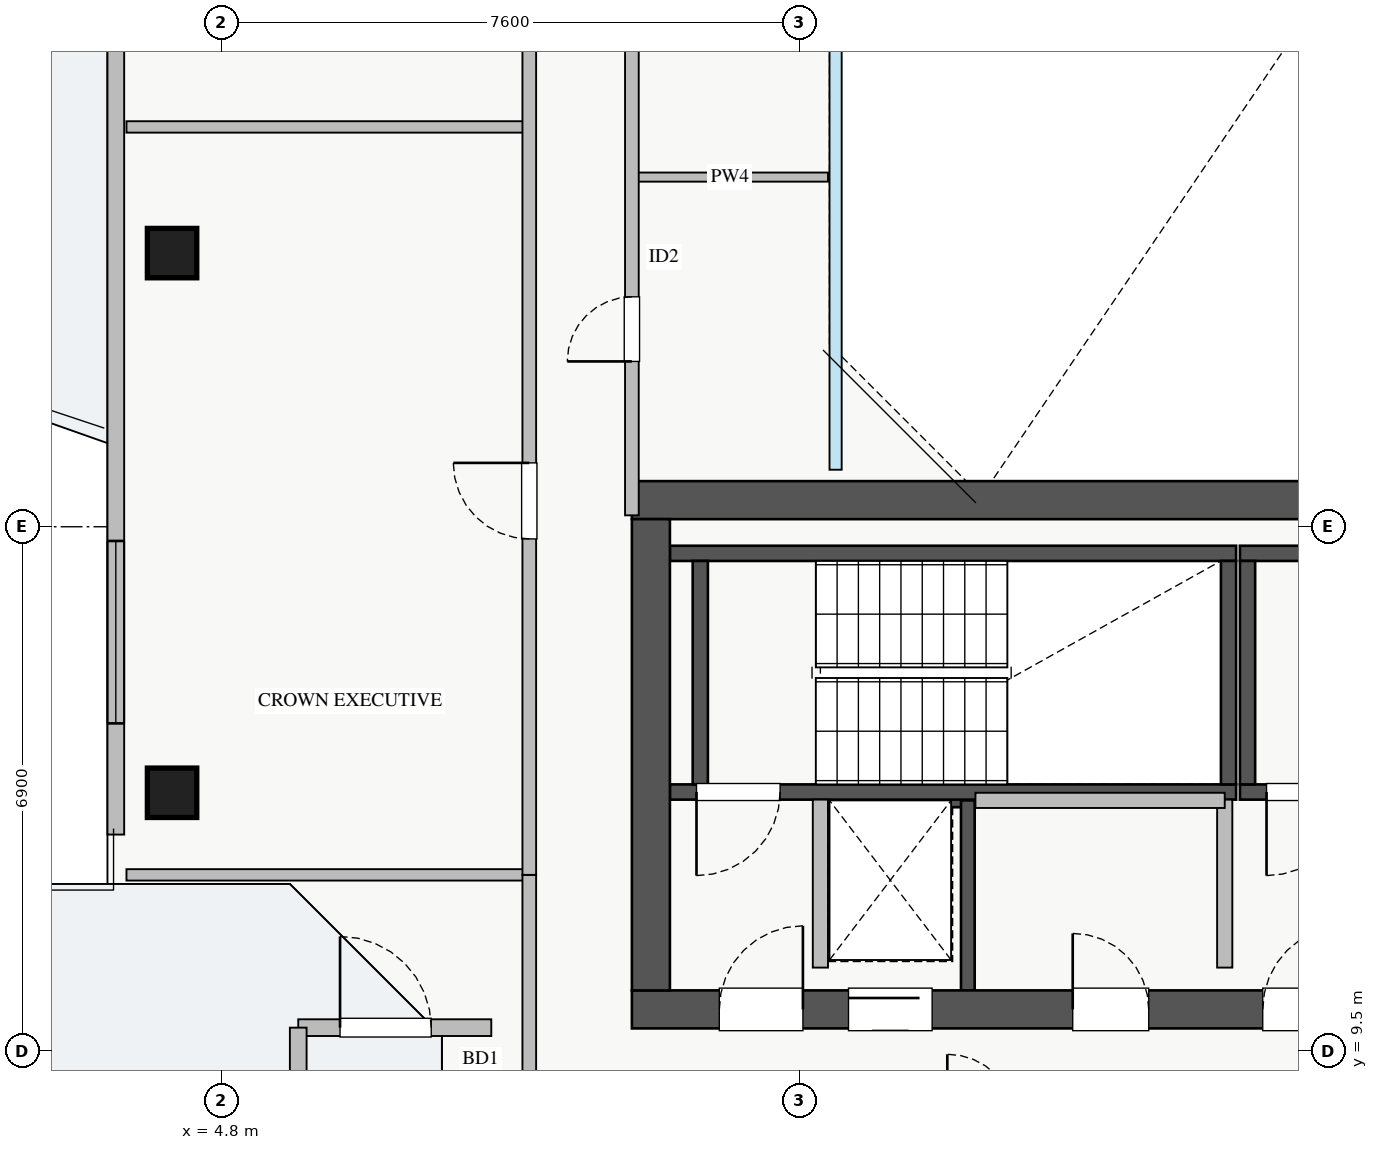
"""IFC4 building model, lengths in metres.
Left out: names, types, materials, properties, quantities, classifications, styles, units other than length and angle.
Written with IfcOpenShell. Run it as: python <this file> out.ifc"""

import sys

from ifc_helpers import new_model, si_unit, direction, frame, frame_2d, origin, origin_2d, place, context, subcontext, project, spatial, rectangle, extrude, source, transform, mapped, element, fill, save


model = new_model("IFC4")
c1 = context("Model", 3, precision=1e-05, world=origin(), true_north=direction((0.0, 1.0)))
c2 = subcontext(c1, "Body", "Model", "MODEL_VIEW")
j1 = project(units=[si_unit("LENGTHUNIT", "METRE"), si_unit("PLANEANGLEUNIT", "RADIAN")], contexts=[c1])
p1 = place(None, origin())
s1 = spatial("IfcSite", under=j1, at=p1, CompositionType="ELEMENT")
p2 = place(p1, origin())
s2 = spatial("IfcBuilding", under=s1, at=p2, CompositionType="ELEMENT")
p3 = place(p2, frame((0.0, 0.0, 243.75)))
s3 = spatial("IfcBuildingStorey", under=s2, at=p3, CompositionType="ELEMENT", Elevation=243.75)
p4 = place(p3, frame((12.68, 12.8, 0.0), z_axis=(0.0, 0.0, 1.0), x_axis=(1.0, 0.0, 0.0)))
e1 = element("IfcWall", 1, at=p4, inside=s3, PredefinedType="SHEAR", context=c2, shape_type="SweptSolid", body=[
    extrude(rectangle(XDim=1.94, YDim=0.18, at=frame_2d((0.97, 0.0))), origin(), (0.0, 0.0, 1.0), 3.07),
])
p5 = place(p3, frame((14.62, 10.3, 0.0), z_axis=(0.0, 0.0, 1.0), x_axis=(0.0, 1.0, 0.0)))
e2 = element("IfcWall", 2, at=p5, inside=s3, PredefinedType="SHEAR", context=c2, shape_type="SweptSolid", body=[
    extrude(rectangle(XDim=2.5, YDim=0.18, at=frame_2d((1.25, 0.0))), origin(), (0.0, 0.0, 1.0), 3.07),
])
p6 = place(p3, frame((10.7, 12.91, 0.0), z_axis=(0.0, 0.0, 1.0), x_axis=(1.0, 0.0, 0.0)))
e3 = element("IfcWall", 3, at=p6, inside=s3, PredefinedType="SHEAR", context=c2, shape_type="SweptSolid", body=[
    extrude(rectangle(XDim=7.45, YDim=0.2, at=frame_2d((3.725, 0.0))), origin(), (0.0, 0.0, 1.0), 3.25),
])
p7 = place(p6, frame((0.35, 0.0, 0.0)))
e4 = element("IfcOpeningElement", 4, at=p7, cuts=e3, PredefinedType="OPENING", context=c2, shape_type="SweptSolid", body=[
    extrude(rectangle(XDim=1.1, YDim=2.05, at=frame_2d((0.55, 1.025))), frame((0.0, 0.11, 0.0), z_axis=(0.0, -1.0, 0.0), x_axis=(1.0, 0.0, 0.0)), (0.0, 0.0, 1.0), 0.22),
])
p8 = place(p3, frame((10.7, 16.05, 0.0), z_axis=(0.0, 0.0, 1.0), x_axis=(1.0, 0.0, 0.0)))
e5 = element("IfcWall", 5, at=p8, inside=s3, PredefinedType="SHEAR", context=c2, shape_type="SweptSolid", body=[
    extrude(rectangle(XDim=7.45, YDim=0.2, at=frame_2d((3.725, 0.0))), origin(), (0.0, 0.0, 1.0), 3.25),
])
for number, where, z_axis, x_axis in (
    (6, (11.1, 13.01, 0.0), (0.0, 0.0, 1.0), (0.0, 1.0, 0.0)),
    (7, (18.05, 13.01, 0.0), (0.0, 0.0, 1.0), (0.0, 1.0, 0.0)),
):
    element("IfcWall", number, at=place(p3, frame(where, z_axis=z_axis, x_axis=x_axis)), inside=s3, PredefinedType="SHEAR", context=c2, shape_type="SweptSolid", body=[
        extrude(rectangle(XDim=2.94, YDim=0.2, at=frame_2d((1.47, 0.0))), origin(), (0.0, 0.0, 1.0), 3.25),
    ])
p9 = place(p3, frame((18.2, 12.91, 0.0), z_axis=(0.0, 0.0, 1.0), x_axis=(1.0, 0.0, 0.0)))
e8 = element("IfcWall", 8, at=p9, inside=s3, PredefinedType="SHEAR", context=c2, shape_type="SweptSolid", body=[
    extrude(rectangle(XDim=7.15, YDim=0.2, at=frame_2d((3.575, 0.0))), origin(), (0.0, 0.0, 1.0), 3.25),
])
p10 = place(p9, frame((0.35, 0.0, 0.0)))
e9 = element("IfcOpeningElement", 9, at=p10, cuts=e8, PredefinedType="OPENING", context=c2, shape_type="SweptSolid", body=[
    extrude(rectangle(XDim=1.1, YDim=2.05, at=frame_2d((0.55, 1.025))), frame((0.0, 0.11, 0.0), z_axis=(0.0, -1.0, 0.0), x_axis=(1.0, 0.0, 0.0)), (0.0, 0.0, 1.0), 0.22),
])
p11 = place(p3, frame((18.2, 16.05, 0.0), z_axis=(0.0, 0.0, 1.0), x_axis=(1.0, 0.0, 0.0)))
e10 = element("IfcWall", 10, at=p11, inside=s3, PredefinedType="SHEAR", context=c2, shape_type="SweptSolid", body=[
    extrude(rectangle(XDim=7.15, YDim=0.2, at=frame_2d((3.575, 0.0))), origin(), (0.0, 0.0, 1.0), 3.25),
])
p12 = place(p3, frame((18.3, 13.01, 0.0), z_axis=(0.0, 0.0, 1.0), x_axis=(0.0, 1.0, 0.0)))
e11 = element("IfcWall", 11, at=p12, inside=s3, PredefinedType="SHEAR", context=c2, shape_type="SweptSolid", body=[
    extrude(rectangle(XDim=2.94, YDim=0.2, at=frame_2d((1.47, 0.0))), origin(), (0.0, 0.0, 1.0), 3.25),
])
p13 = place(p3, frame((10.2, 10.05, 0.0), z_axis=(0.0, 0.0, 1.0), x_axis=(1.0, 0.0, 0.0)))
e12 = element("IfcWall", 12, at=p13, inside=s3, PredefinedType="SHEAR", context=c2, shape_type="SweptSolid", body=[
    extrude(rectangle(XDim=17.6, YDim=0.5, at=frame_2d((8.8, 0.0))), origin(), (0.0, 0.0, 1.0), 3.25),
])
p14 = place(p13, frame((1.15, 0.0, 0.0)))
e13 = element("IfcOpeningElement", 13, at=p14, cuts=e12, PredefinedType="OPENING", context=c2, shape_type="SweptSolid", body=[
    extrude(rectangle(XDim=1.1, YDim=2.05, at=frame_2d((0.55, 1.025))), frame((0.0, 0.26, 0.0), z_axis=(0.0, -1.0, 0.0), x_axis=(1.0, 0.0, 0.0)), (0.0, 0.0, 1.0), 0.52),
])
p15 = place(p13, frame((8.3, 0.0, 0.0)))
e14 = element("IfcOpeningElement", 14, at=p15, cuts=e12, PredefinedType="OPENING", context=c2, shape_type="SweptSolid", body=[
    extrude(rectangle(XDim=1.1, YDim=2.05, at=frame_2d((0.55, 1.025))), frame((0.0, 0.26, 0.0), z_axis=(0.0, -1.0, 0.0), x_axis=(1.0, 0.0, 0.0)), (0.0, 0.0, 1.0), 0.52),
])
p16 = place(p13, frame((2.85, 0.0, 0.0)))
e15 = element("IfcOpeningElement", 15, at=p16, cuts=e12, PredefinedType="OPENING", context=c2, shape_type="SweptSolid", body=[
    extrude(rectangle(XDim=1.1, YDim=2.05, at=frame_2d((0.55, 1.025))), frame((0.0, 0.26, 0.0), z_axis=(0.0, -1.0, 0.0), x_axis=(1.0, 0.0, 0.0)), (0.0, 0.0, 1.0), 0.52),
])
p17 = place(p13, frame((5.8, 0.0, 0.0)))
e16 = element("IfcOpeningElement", 16, at=p17, cuts=e12, PredefinedType="OPENING", context=c2, shape_type="SweptSolid", body=[
    extrude(rectangle(XDim=1.0, YDim=2.05, at=frame_2d((0.5, 1.025))), frame((0.0, 0.26, 0.0), z_axis=(0.0, -1.0, 0.0), x_axis=(1.0, 0.0, 0.0)), (0.0, 0.0, 1.0), 0.52),
])
p18 = place(p13, frame((14.74, 0.0, 0.0)))
e17 = element("IfcOpeningElement", 17, at=p18, cuts=e12, PredefinedType="OPENING", context=c2, shape_type="SweptSolid", body=[
    extrude(rectangle(XDim=1.0, YDim=2.05, at=frame_2d((0.5, 1.025))), frame((0.0, 0.26, 0.0), z_axis=(0.0, -1.0, 0.0), x_axis=(1.0, 0.0, 0.0)), (0.0, 0.0, 1.0), 0.52),
])
p19 = place(p13, frame((10.155, 0.0, 0.0)))
e18 = element("IfcOpeningElement", 18, at=p19, cuts=e12, PredefinedType="OPENING", context=c2, shape_type="SweptSolid", body=[
    extrude(rectangle(XDim=1.0, YDim=2.05, at=frame_2d((0.5, 1.025))), frame((0.0, 0.26, 0.0), z_axis=(0.0, -1.0, 0.0), x_axis=(1.0, 0.0, 0.0)), (0.0, 0.0, 1.0), 0.52),
])
p20 = place(p13, frame((11.87, 0.0, 0.0)))
e19 = element("IfcOpeningElement", 19, at=p20, cuts=e12, PredefinedType="OPENING", context=c2, shape_type="SweptSolid", body=[
    extrude(rectangle(XDim=1.0, YDim=2.05, at=frame_2d((0.5, 1.025))), frame((0.0, 0.26, 0.0), z_axis=(0.0, -1.0, 0.0), x_axis=(1.0, 0.0, 0.0)), (0.0, 0.0, 1.0), 0.52),
])
p21 = place(p13, frame((13.46, 0.0, 0.0)))
e20 = element("IfcOpeningElement", 20, at=p21, cuts=e12, PredefinedType="OPENING", context=c2, shape_type="SweptSolid", body=[
    extrude(rectangle(XDim=1.0, YDim=2.05, at=frame_2d((0.5, 1.025))), frame((0.0, 0.26, 0.0), z_axis=(0.0, -1.0, 0.0), x_axis=(1.0, 0.0, 0.0)), (0.0, 0.0, 1.0), 0.52),
])
p22 = place(p3, frame((10.2, 16.75, 0.0), z_axis=(0.0, 0.0, 1.0), x_axis=(1.0, 0.0, 0.0)))
e21 = element("IfcWall", 21, at=p22, inside=s3, PredefinedType="SHEAR", context=c2, shape_type="SweptSolid", body=[
    extrude(rectangle(XDim=17.6, YDim=0.5, at=frame_2d((8.8, 0.0))), origin(), (0.0, 0.0, 1.0), 3.25),
])
p23 = place(p3, frame((10.45, 10.3, 0.0), z_axis=(0.0, 0.0, 1.0), x_axis=(0.0, 1.0, 0.0)))
e22 = element("IfcWall", 22, at=p23, inside=s3, PredefinedType="SHEAR", context=c2, shape_type="SweptSolid", body=[
    extrude(rectangle(XDim=6.2, YDim=0.5, at=frame_2d((3.1, 0.0))), origin(), (0.0, 0.0, 1.0), 3.25),
])
m1 = source(origin(), c2, "Body", "SweptSolid", [
    extrude(rectangle(XDim=0.65, YDim=0.65, at=origin_2d()), origin(), (0.0, 0.0, 1.0), 3.25),
])
for number, where, z_axis, x_axis in (
    (23, (4.15, 20.0, 0.0), (0.0, 0.0, 1.0), (1.0, 0.0, 0.0)),
    (24, (4.15, 12.9, 0.0), (0.0, 0.0, 1.0), (1.0, 0.0, 0.0)),
):
    element("IfcColumn", number, at=place(p3, frame(where, z_axis=z_axis, x_axis=x_axis)), inside=s3, PredefinedType="COLUMN", context=c2, shape_type="MappedRepresentation", body=[
        mapped(m1, transform((0.0, 0.0, 0.0), x_axis=(1.0, 0.0, 0.0), y_axis=(0.0, 1.0, 0.0), z_axis=(0.0, 0.0, 1.0), scale=1.0)),
    ])
p24 = place(p3, frame((3.41, 12.35, 0.0), z_axis=(0.0, 0.0, 1.0), x_axis=(0.0, 1.0, 0.0)))
e25 = element("IfcWall", 25, at=p24, inside=s3, PredefinedType="STANDARD", context=c2, shape_type="SweptSolid", body=[
    extrude(rectangle(XDim=21.3, YDim=0.22, at=frame_2d((10.65, 0.0))), origin(), (0.0, 0.0, 1.0), 2.61),
])
p25 = place(p24, frame((11.5, 0.0, 0.0)))
e26 = element("IfcOpeningElement", 26, at=p25, cuts=e25, PredefinedType="OPENING", context=c2, shape_type="SweptSolid", body=[
    extrude(rectangle(XDim=1.2, YDim=2.1, at=frame_2d((0.6, 1.05))), frame((0.0, 0.12, 0.0), z_axis=(0.0, -1.0, 0.0), x_axis=(1.0, 0.0, 0.0)), (0.0, 0.0, 1.0), 0.24),
])
p26 = place(p24, frame((1.463, 0.0, 0.9)))
e27 = element("IfcOpeningElement", 27, at=p26, cuts=e25, PredefinedType="OPENING", context=c2, shape_type="SweptSolid", body=[
    extrude(rectangle(XDim=2.4, YDim=1.48, at=frame_2d((1.2, 0.74))), frame((0.0, 0.12, 0.0), z_axis=(0.0, -1.0, 0.0), x_axis=(1.0, 0.0, 0.0)), (0.0, 0.0, 1.0), 0.24),
])
p27 = place(p24, frame((17.588, 0.0, 0.9)))
e28 = element("IfcOpeningElement", 28, at=p27, cuts=e25, PredefinedType="OPENING", context=c2, shape_type="SweptSolid", body=[
    extrude(rectangle(XDim=2.1, YDim=1.48, at=frame_2d((1.05, 0.74))), frame((0.0, 0.12, 0.0), z_axis=(0.0, -1.0, 0.0), x_axis=(1.0, 0.0, 0.0)), (0.0, 0.0, 1.0), 0.24),
])
p28 = place(p3, frame((5.81, 9.81, 0.0), z_axis=(0.0, 0.0, 1.0), x_axis=(1.0, 0.0, 0.0)))
e29 = element("IfcWall", 29, at=p28, inside=s3, PredefinedType="STANDARD", context=c2, shape_type="SweptSolid", body=[
    extrude(rectangle(XDim=2.54, YDim=0.22, at=frame_2d((1.27, 0.0))), origin(), (0.0, 0.0, 1.0), 2.61),
])
p29 = place(p28, frame((0.55, 0.0, 0.0)))
e30 = element("IfcOpeningElement", 30, at=p29, cuts=e29, PredefinedType="OPENING", context=c2, shape_type="SweptSolid", body=[
    extrude(rectangle(XDim=1.2, YDim=2.1, at=frame_2d((0.6, 1.05))), frame((0.0, 0.12, 0.0), z_axis=(0.0, -1.0, 0.0), x_axis=(1.0, 0.0, 0.0)), (0.0, 0.0, 1.0), 0.24),
])
p30 = place(p3, frame((5.81, 7.15, 0.0), z_axis=(0.0, 0.0, 1.0), x_axis=(0.0, 1.0, 0.0)))
e31 = element("IfcWall", 31, at=p30, inside=s3, PredefinedType="STANDARD", context=c2, shape_type="SweptSolid", body=[
    extrude(rectangle(XDim=2.66, YDim=0.22, at=frame_2d((1.33, 0.0))), origin(), (0.0, 0.0, 1.0), 2.61),
])
for number, where, z_axis, x_axis in (
    (32, (12.68, 10.6, 0.0), (0.0, 0.0, 1.0), (0.0, 1.0, 0.0)),
    (33, (18.0, 10.6, 0.0), (0.0, 0.0, 1.0), (0.0, 1.0, 0.0)),
):
    element("IfcWall", number, at=place(p3, frame(where, z_axis=z_axis, x_axis=x_axis)), inside=s3, PredefinedType="PARTITIONING", context=c2, shape_type="SweptSolid", body=[
        extrude(rectangle(XDim=2.21, YDim=0.2, at=frame_2d((1.105, 0.0))), origin(), (0.0, 0.0, 1.0), 3.07),
    ])
p31 = place(p3, frame((14.72, 12.8, 0.0), z_axis=(0.0, 0.0, 1.0), x_axis=(1.0, 0.0, 0.0)))
e34 = element("IfcWall", 34, at=p31, inside=s3, PredefinedType="PARTITIONING", context=c2, shape_type="SweptSolid", body=[
    extrude(rectangle(XDim=3.28, YDim=0.2, at=frame_2d((1.64, 0.0))), origin(), (0.0, 0.0, 1.0), 3.07),
])
p32 = place(p3, frame((3.55, 11.82, 0.0), z_axis=(0.0, 0.0, 1.0), x_axis=(1.0, 0.0, 0.0)))
e35 = element("IfcWall", 35, at=p32, inside=s3, PredefinedType="PARTITIONING", context=c2, shape_type="SweptSolid", body=[
    extrude(rectangle(XDim=5.3, YDim=0.15, at=frame_2d((2.65, 0.0))), origin(), (0.0, 0.0, 1.0), 3.07),
])
p33 = place(p3, frame((8.85, 8.56, 0.0), z_axis=(0.0, 0.0, 1.0), x_axis=(0.0, 1.0, 0.0)))
e36 = element("IfcWall", 36, at=p33, inside=s3, PredefinedType="PARTITIONING", context=c2, shape_type="SweptSolid", body=[
    extrude(rectangle(XDim=3.26, YDim=0.18, at=frame_2d((1.63, 0.0))), origin(), (0.0, 0.0, 1.0), 2.569),
])
p34 = place(p3, frame((3.55, 21.66, 0.0), z_axis=(0.0, 0.0, 1.0), x_axis=(1.0, 0.0, 0.0)))
e37 = element("IfcWall", 37, at=p34, inside=s3, PredefinedType="PARTITIONING", context=c2, shape_type="SweptSolid", body=[
    extrude(rectangle(XDim=5.3, YDim=0.15, at=frame_2d((2.65, 0.0))), origin(), (0.0, 0.0, 1.0), 2.771),
])
p35 = place(p3, frame((8.85, 11.82, 0.0), z_axis=(0.0, 0.0, 1.0), x_axis=(0.0, 1.0, 0.0)))
e38 = element("IfcWall", 38, at=p35, inside=s3, PredefinedType="PARTITIONING", context=c2, shape_type="SweptSolid", body=[
    extrude(rectangle(XDim=22.36, YDim=0.18, at=frame_2d((11.18, 0.0))), origin(), (0.0, 0.0, 1.0), 2.569),
])
p36 = place(p35, frame((4.42, 0.0, 0.0)))
e39 = element("IfcOpeningElement", 39, at=p36, cuts=e38, PredefinedType="OPENING", context=c2, shape_type="SweptSolid", body=[
    extrude(rectangle(XDim=1.0, YDim=2.05, at=frame_2d((0.5, 1.025))), frame((0.0, 0.1, 0.0), z_axis=(0.0, -1.0, 0.0), x_axis=(1.0, 0.0, 0.0)), (0.0, 0.0, 1.0), 0.2),
])
p37 = place(p35, frame((12.695, 0.0, 0.0)))
e40 = element("IfcOpeningElement", 40, at=p37, cuts=e38, PredefinedType="OPENING", context=c2, shape_type="SweptSolid", body=[
    extrude(rectangle(XDim=1.0, YDim=2.05, at=frame_2d((0.5, 1.025))), frame((0.0, 0.1, 0.0), z_axis=(0.0, -1.0, 0.0), x_axis=(1.0, 0.0, 0.0)), (0.0, 0.0, 1.0), 0.2),
])
p38 = place(p35, frame((18.955, 0.0, 0.0)))
e41 = element("IfcOpeningElement", 41, at=p38, cuts=e38, PredefinedType="OPENING", context=c2, shape_type="SweptSolid", body=[
    extrude(rectangle(XDim=1.0, YDim=2.05, at=frame_2d((0.5, 1.025))), frame((0.0, 0.1, 0.0), z_axis=(0.0, -1.0, 0.0), x_axis=(1.0, 0.0, 0.0)), (0.0, 0.0, 1.0), 0.2),
])
p39 = place(p3, frame((10.2, 21.0, 0.0), z_axis=(0.0, 0.0, 1.0), x_axis=(1.0, 0.0, 0.0)))
e42 = element("IfcWall", 42, at=p39, inside=s3, PredefinedType="PLUMBINGWALL", context=c2, shape_type="SweptSolid", body=[
    extrude(rectangle(XDim=2.58, YDim=0.12, at=frame_2d((1.29, 0.0))), origin(), (0.0, 0.0, 1.0), 3.07),
])
p40 = place(p3, frame((10.2, 16.55, 0.0), z_axis=(0.0, 0.0, 1.0), x_axis=(0.0, 1.0, 0.0)))
e43 = element("IfcWall", 43, at=p40, inside=s3, PredefinedType="PARTITIONING", context=c2, shape_type="SweptSolid", body=[
    extrude(rectangle(XDim=12.9, YDim=0.18, at=frame_2d((6.45, 0.0))), origin(), (0.0, 0.0, 1.0), 3.07),
])
p41 = place(p40, frame((2.025, 0.0, 0.0)))
e44 = element("IfcOpeningElement", 44, at=p41, cuts=e43, PredefinedType="OPENING", context=c2, shape_type="SweptSolid", body=[
    extrude(rectangle(XDim=0.85, YDim=2.05, at=frame_2d((0.425, 1.025))), frame((0.0, 0.1, 0.0), z_axis=(0.0, -1.0, 0.0), x_axis=(1.0, 0.0, 0.0)), (0.0, 0.0, 1.0), 0.2),
])
p42 = place(p40, frame((8.0, 0.0, 0.0)))
e45 = element("IfcOpeningElement", 45, at=p42, cuts=e43, PredefinedType="OPENING", context=c2, shape_type="SweptSolid", body=[
    extrude(rectangle(XDim=0.9, YDim=2.05, at=frame_2d((0.45, 1.025))), frame((0.0, 0.1, 0.0), z_axis=(0.0, -1.0, 0.0), x_axis=(1.0, 0.0, 0.0)), (0.0, 0.0, 1.0), 0.2),
])
m2 = source(origin(), c2, "Body", "SweptSolid", [
    extrude(rectangle(XDim=2.4, YDim=1.48, at=frame_2d((1.2, 0.74))), frame((0.0, 0.03, 0.0), z_axis=(0.0, -1.0, 0.0), x_axis=(1.0, 0.0, 0.0)), (0.0, 0.0, 1.0), 0.06),
])
p43 = place(p26, origin())
e46 = element("IfcWindow", 46, at=p43, inside=s3, PartitioningType="TRIPLE_PANEL_VERTICAL", PredefinedType="WINDOW", context=c2, shape_type="MappedRepresentation", body=[
    mapped(m2, transform((0.0, 0.0, 0.0), x_axis=(1.0, 0.0, 0.0), y_axis=(0.0, 1.0, 0.0), z_axis=(0.0, 0.0, 1.0), scale=1.0)),
])
fill(e27, e46)
m3 = source(origin(), c2, "Body", "SweptSolid", [
    extrude(rectangle(XDim=1.2, YDim=2.1, at=frame_2d((0.6, 1.05))), frame((0.0, 0.025, 0.0), z_axis=(0.0, -1.0, 0.0), x_axis=(1.0, 0.0, 0.0)), (0.0, 0.0, 1.0), 0.05),
])
p44 = place(p29, origin())
e47 = element("IfcDoor", 47, at=p44, inside=s3, OperationType="SINGLE_SWING_LEFT", PredefinedType="DOOR", context=c2, shape_type="MappedRepresentation", body=[
    mapped(m3, transform((0.0, 0.0, 0.0), x_axis=(1.0, 0.0, 0.0), y_axis=(0.0, 1.0, 0.0), z_axis=(0.0, 0.0, 1.0), scale=1.0)),
])
fill(e30, e47)
m4 = source(origin(), c2, "Body", "SweptSolid", [
    extrude(rectangle(XDim=1.1, YDim=2.05, at=frame_2d((0.55, 1.025))), frame((0.0, 0.025, 0.0), z_axis=(0.0, -1.0, 0.0), x_axis=(1.0, 0.0, 0.0)), (0.0, 0.0, 1.0), 0.05),
])
p45 = place(p14, origin())
e48 = element("IfcDoor", 48, at=p45, inside=s3, OperationType="SINGLE_SWING_RIGHT", PredefinedType="DOOR", context=c2, shape_type="MappedRepresentation", body=[
    mapped(m4, transform((0.0, 0.0, 0.0), x_axis=(1.0, 0.0, 0.0), y_axis=(0.0, 1.0, 0.0), z_axis=(0.0, 0.0, 1.0), scale=1.0)),
])
fill(e13, e48)
p46 = place(p7, frame((1.1, 0.0, 0.0), z_axis=(0.0, 0.0, 1.0), x_axis=(-1.0, 0.0, 0.0)))
e49 = element("IfcDoor", 49, at=p46, inside=s3, OperationType="SINGLE_SWING_LEFT", PredefinedType="DOOR", context=c2, shape_type="MappedRepresentation", body=[
    mapped(m4, transform((0.0, 0.0, 0.0), x_axis=(1.0, 0.0, 0.0), y_axis=(0.0, 1.0, 0.0), z_axis=(0.0, 0.0, 1.0), scale=1.0)),
])
fill(e4, e49)
p47 = place(p15, origin())
e50 = element("IfcDoor", 50, at=p47, inside=s3, OperationType="SINGLE_SWING_RIGHT", PredefinedType="DOOR", context=c2, shape_type="MappedRepresentation", body=[
    mapped(m4, transform((0.0, 0.0, 0.0), x_axis=(1.0, 0.0, 0.0), y_axis=(0.0, 1.0, 0.0), z_axis=(0.0, 0.0, 1.0), scale=1.0)),
])
fill(e14, e50)
p48 = place(p10, frame((1.1, 0.0, 0.0), z_axis=(0.0, 0.0, 1.0), x_axis=(-1.0, 0.0, 0.0)))
e51 = element("IfcDoor", 51, at=p48, inside=s3, OperationType="SINGLE_SWING_LEFT", PredefinedType="DOOR", context=c2, shape_type="MappedRepresentation", body=[
    mapped(m4, transform((0.0, 0.0, 0.0), x_axis=(1.0, 0.0, 0.0), y_axis=(0.0, 1.0, 0.0), z_axis=(0.0, 0.0, 1.0), scale=1.0)),
])
fill(e9, e51)
p49 = place(p16, origin())
e52 = element("IfcDoor", 52, at=p49, inside=s3, OperationType="SLIDING_TO_RIGHT", PredefinedType="DOOR", context=c2, shape_type="MappedRepresentation", body=[
    mapped(m4, transform((0.0, 0.0, 0.0), x_axis=(1.0, 0.0, 0.0), y_axis=(0.0, 1.0, 0.0), z_axis=(0.0, 0.0, 1.0), scale=1.0)),
])
fill(e15, e52)
m5 = source(origin(), c2, "Body", "SweptSolid", [
    extrude(rectangle(XDim=1.0, YDim=2.05, at=frame_2d((0.5, 1.025))), frame((0.0, 0.025, 0.0), z_axis=(0.0, -1.0, 0.0), x_axis=(1.0, 0.0, 0.0)), (0.0, 0.0, 1.0), 0.05),
])
p50 = place(p17, origin())
e53 = element("IfcDoor", 53, at=p50, inside=s3, OperationType="SINGLE_SWING_LEFT", PredefinedType="DOOR", context=c2, shape_type="MappedRepresentation", body=[
    mapped(m5, transform((0.0, 0.0, 0.0), x_axis=(1.0, 0.0, 0.0), y_axis=(0.0, 1.0, 0.0), z_axis=(0.0, 0.0, 1.0), scale=1.0)),
])
fill(e16, e53)
p51 = place(p36, origin())
e54 = element("IfcDoor", 54, at=p51, inside=s3, OperationType="SINGLE_SWING_RIGHT", PredefinedType="DOOR", context=c2, shape_type="MappedRepresentation", body=[
    mapped(m5, transform((0.0, 0.0, 0.0), x_axis=(1.0, 0.0, 0.0), y_axis=(0.0, 1.0, 0.0), z_axis=(0.0, 0.0, 1.0), scale=1.0)),
])
fill(e39, e54)
m6 = source(origin(), c2, "Body", "SweptSolid", [
    extrude(rectangle(XDim=0.85, YDim=2.05, at=frame_2d((0.425, 1.025))), frame((0.0, 0.025, 0.0), z_axis=(0.0, -1.0, 0.0), x_axis=(1.0, 0.0, 0.0)), (0.0, 0.0, 1.0), 0.05),
])
p52 = place(p41, origin())
e55 = element("IfcDoor", 55, at=p52, inside=s3, OperationType="SINGLE_SWING_LEFT", PredefinedType="DOOR", context=c2, shape_type="MappedRepresentation", body=[
    mapped(m6, transform((0.0, 0.0, 0.0), x_axis=(1.0, 0.0, 0.0), y_axis=(0.0, 1.0, 0.0), z_axis=(0.0, 0.0, 1.0), scale=1.0)),
])
fill(e44, e55)
save(model, sys.argv[1])
